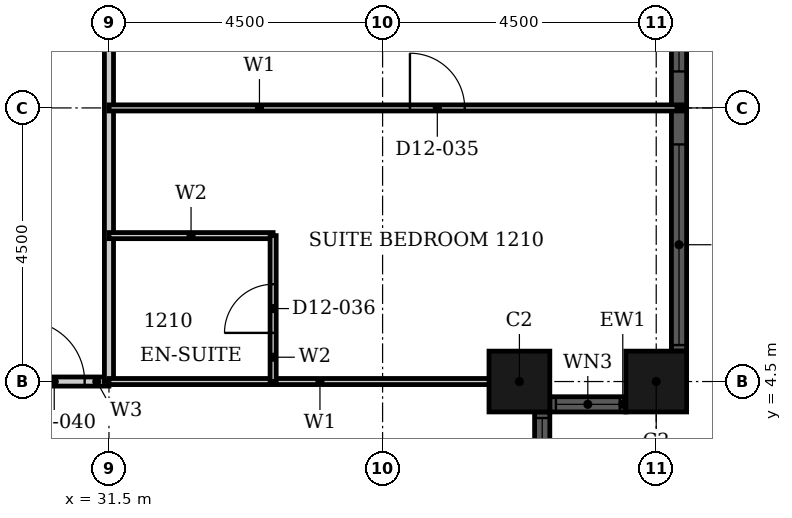
"""IFC4 building model, lengths in metres.
Left out: names, types, materials, properties, quantities, classifications, styles, units other than length and angle.
Written with IfcOpenShell. Run it as: python <this file> out.ifc"""

import sys

from ifc_helpers import new_model, si_unit, direction, frame, frame_2d, origin, origin_2d, place, context, subcontext, project, spatial, rectangle, hollow_rectangle, extrude, element, fill, save


model = new_model("IFC4")
c1 = context("Model", 3, precision=1e-05, world=origin(), true_north=direction((0.0, 1.0)))
c2 = subcontext(c1, "Body", "Model", "MODEL_VIEW")
j1 = project(units=[si_unit("LENGTHUNIT", "METRE"), si_unit("PLANEANGLEUNIT", "RADIAN")], contexts=[c1])
p1 = place(None, origin())
s1 = spatial("IfcSite", under=j1, at=p1, CompositionType="ELEMENT")
p2 = place(p1, origin())
s2 = spatial("IfcBuilding", under=s1, at=p2, CompositionType="ELEMENT")
p3 = place(p2, frame((0.0, 0.0, 56.4)))
s3 = spatial("IfcBuildingStorey", under=s2, at=p3, CompositionType="ELEMENT", Elevation=56.4)
for number, where, z_axis, x_axis in (
    (1, (38.25, 4.5, 0.0), (0.0, 0.0, 1.0), (1.0, 0.0, 0.0)),
    (2, (40.5, 4.5, 0.0), (0.0, 0.0, 1.0), (1.0, 0.0, 0.0)),
):
    element("IfcColumn", number, at=place(p3, frame(where, z_axis=z_axis, x_axis=x_axis)), inside=s3, PredefinedType="COLUMN", context=c2, shape_type="SweptSolid", body=[
        extrude(hollow_rectangle(XDim=1.0, YDim=1.0, WallThickness=0.032, at=origin_2d()), origin(), (0.0, 0.0, 1.0), 3.6),
    ])
p4 = place(p3, frame((38.625, 2.75, 0.0), z_axis=(0.0, 0.0, 1.0), x_axis=(0.0, 1.0, 0.0)))
e3 = element("IfcWall", 3, at=p4, inside=s3, PredefinedType="SOLIDWALL", context=c2, shape_type="SweptSolid", body=[
    extrude(rectangle(XDim=1.25, YDim=0.25, at=frame_2d((0.625, 0.0))), origin(), (0.0, 0.0, 1.0), 3.6),
])
p5 = place(p4, frame((0.1, 0.0, 0.9)))
e4 = element("IfcOpeningElement", 4, at=p5, cuts=e3, PredefinedType="OPENING", context=c2, shape_type="SweptSolid", body=[
    extrude(rectangle(XDim=1.05, YDim=2.08, at=frame_2d((0.525, 1.04))), frame((0.0, 0.135, 0.0), z_axis=(0.0, -1.0, 0.0), x_axis=(1.0, 0.0, 0.0)), (0.0, 0.0, 1.0), 0.27),
])
p6 = place(p3, frame((38.75, 4.125, 0.0), z_axis=(0.0, 0.0, 1.0), x_axis=(1.0, 0.0, 0.0)))
e5 = element("IfcWall", 5, at=p6, inside=s3, PredefinedType="SOLIDWALL", context=c2, shape_type="SweptSolid", body=[
    extrude(rectangle(XDim=1.25, YDim=0.25, at=frame_2d((0.625, 0.0))), origin(), (0.0, 0.0, 1.0), 3.6),
])
p7 = place(p6, frame((0.1, 0.0, 0.9)))
e6 = element("IfcOpeningElement", 6, at=p7, cuts=e5, PredefinedType="OPENING", context=c2, shape_type="SweptSolid", body=[
    extrude(rectangle(XDim=1.05, YDim=2.08, at=frame_2d((0.525, 1.04))), frame((0.0, 0.135, 0.0), z_axis=(0.0, -1.0, 0.0), x_axis=(1.0, 0.0, 0.0)), (0.0, 0.0, 1.0), 0.27),
])
p8 = place(p3, frame((40.875, 5.0, 0.0), z_axis=(0.0, 0.0, 1.0), x_axis=(0.0, 1.0, 0.0)))
e7 = element("IfcWall", 7, at=p8, inside=s3, PredefinedType="SOLIDWALL", context=c2, shape_type="SweptSolid", body=[
    extrude(rectangle(XDim=8.0, YDim=0.25, at=frame_2d((4.0, 0.0))), origin(), (0.0, 0.0, 1.0), 3.6),
])
p9 = place(p8, frame((0.1, 0.0, 0.9)))
e8 = element("IfcOpeningElement", 8, at=p9, cuts=e7, PredefinedType="OPENING", context=c2, shape_type="SweptSolid", body=[
    extrude(rectangle(XDim=3.3, YDim=2.08, at=frame_2d((1.65, 1.04))), frame((0.0, 0.135, 0.0), z_axis=(0.0, -1.0, 0.0), x_axis=(1.0, 0.0, 0.0)), (0.0, 0.0, 1.0), 0.27),
])
p10 = place(p8, frame((4.6, 0.0, 0.9)))
e9 = element("IfcOpeningElement", 9, at=p10, cuts=e7, PredefinedType="OPENING", context=c2, shape_type="SweptSolid", body=[
    extrude(rectangle(XDim=3.3, YDim=2.08, at=frame_2d((1.65, 1.04))), frame((0.0, 0.135, 0.0), z_axis=(0.0, -1.0, 0.0), x_axis=(1.0, 0.0, 0.0)), (0.0, 0.0, 1.0), 0.27),
])
p11 = place(p3, frame((29.7, 4.5, 0.0), z_axis=(0.0, 0.0, 1.0), x_axis=(1.0, 0.0, 0.0)))
e10 = element("IfcWall", 10, at=p11, inside=s3, PredefinedType="PARTITIONING", context=c2, shape_type="SweptSolid", body=[
    extrude(rectangle(XDim=1.8, YDim=0.15, at=frame_2d((0.9, 0.0))), origin(), (0.0, 0.0, 1.0), 3.3),
])
p12 = place(p11, frame((0.4, 0.0, 0.0)))
e11 = element("IfcOpeningElement", 11, at=p12, cuts=e10, PredefinedType="OPENING", context=c2, shape_type="SweptSolid", body=[
    extrude(rectangle(XDim=1.0, YDim=2.1, at=frame_2d((0.5, 1.05))), frame((0.0, 0.085, 0.0), z_axis=(0.0, -1.0, 0.0), x_axis=(1.0, 0.0, 0.0)), (0.0, 0.0, 1.0), 0.17),
])
p13 = place(p3, frame((31.5, 4.5, 0.0), z_axis=(0.0, 0.0, 1.0), x_axis=(0.0, 1.0, 0.0)))
e12 = element("IfcWall", 12, at=p13, inside=s3, PredefinedType="PARTITIONING", context=c2, shape_type="SweptSolid", body=[
    extrude(rectangle(XDim=16.2, YDim=0.15, at=frame_2d((8.1, 0.0))), origin(), (0.0, 0.0, 1.0), 2.58),
])
p14 = place(p13, frame((6.25, 0.0, 0.0)))
e13 = element("IfcOpeningElement", 13, at=p14, cuts=e12, PredefinedType="OPENING", context=c2, shape_type="SweptSolid", body=[
    extrude(rectangle(XDim=1.0, YDim=2.1, at=frame_2d((0.5, 1.05))), frame((0.0, 0.085, 0.0), z_axis=(0.0, -1.0, 0.0), x_axis=(1.0, 0.0, 0.0)), (0.0, 0.0, 1.0), 0.17),
])
p15 = place(p3, frame((31.5, 4.5, 0.0), z_axis=(0.0, 0.0, 1.0), x_axis=(1.0, 0.0, 0.0)))
e14 = element("IfcWall", 14, at=p15, inside=s3, PredefinedType="PARTITIONING", context=c2, shape_type="SweptSolid", body=[
    extrude(rectangle(XDim=6.94, YDim=0.1, at=frame_2d((3.47, 0.0))), origin(), (0.0, 0.0, 1.0), 3.3),
])
p16 = place(p3, frame((31.5, 9.0, 0.0), z_axis=(0.0, 0.0, 1.0), x_axis=(1.0, 0.0, 0.0)))
e15 = element("IfcWall", 15, at=p16, inside=s3, PredefinedType="PARTITIONING", context=c2, shape_type="SweptSolid", body=[
    extrude(rectangle(XDim=9.44, YDim=0.1, at=frame_2d((4.72, 0.0))), origin(), (0.0, 0.0, 1.0), 3.3),
])
p17 = place(p16, frame((4.95, 0.0, 0.0)))
e16 = element("IfcOpeningElement", 16, at=p17, cuts=e15, PredefinedType="OPENING", context=c2, shape_type="SweptSolid", body=[
    extrude(rectangle(XDim=0.9, YDim=2.1, at=frame_2d((0.45, 1.05))), frame((0.0, 0.06, 0.0), z_axis=(0.0, -1.0, 0.0), x_axis=(1.0, 0.0, 0.0)), (0.0, 0.0, 1.0), 0.12),
])
p18 = place(p3, frame((31.5, 6.9, 0.0), z_axis=(0.0, 0.0, 1.0), x_axis=(1.0, 0.0, 0.0)))
e17 = element("IfcWall", 17, at=p18, inside=s3, PredefinedType="PARTITIONING", context=c2, shape_type="SweptSolid", body=[
    extrude(rectangle(XDim=2.7, YDim=0.1, at=frame_2d((1.35, 0.0))), origin(), (0.0, 0.0, 1.0), 3.3),
])
p19 = place(p3, frame((34.2, 4.5, 0.0), z_axis=(0.0, 0.0, 1.0), x_axis=(0.0, 1.0, 0.0)))
e18 = element("IfcWall", 18, at=p19, inside=s3, PredefinedType="PARTITIONING", context=c2, shape_type="SweptSolid", body=[
    extrude(rectangle(XDim=2.4, YDim=0.1, at=frame_2d((1.2, 0.0))), origin(), (0.0, 0.0, 1.0), 3.3),
])
p20 = place(p19, frame((0.8, 0.0, 0.0)))
e19 = element("IfcOpeningElement", 19, at=p20, cuts=e18, PredefinedType="OPENING", context=c2, shape_type="SweptSolid", body=[
    extrude(rectangle(XDim=0.8, YDim=2.1, at=frame_2d((0.4, 1.05))), frame((0.0, 0.06, 0.0), z_axis=(0.0, -1.0, 0.0), x_axis=(1.0, 0.0, 0.0)), (0.0, 0.0, 1.0), 0.12),
])
p21 = place(p5, origin())
e20 = element("IfcWindow", 20, at=p21, inside=s3, PartitioningType="SINGLE_PANEL", PredefinedType="WINDOW", context=c2, shape_type="SweptSolid", body=[
    extrude(rectangle(XDim=1.05, YDim=2.08, at=frame_2d((0.525, 1.04))), frame((0.0, 0.03, 0.0), z_axis=(0.0, -1.0, 0.0), x_axis=(1.0, 0.0, 0.0)), (0.0, 0.0, 1.0), 0.06),
])
fill(e4, e20)
p22 = place(p7, origin())
e21 = element("IfcWindow", 21, at=p22, inside=s3, PartitioningType="SINGLE_PANEL", PredefinedType="WINDOW", context=c2, shape_type="SweptSolid", body=[
    extrude(rectangle(XDim=1.05, YDim=2.08, at=frame_2d((0.525, 1.04))), frame((0.0, 0.03, 0.0), z_axis=(0.0, -1.0, 0.0), x_axis=(1.0, 0.0, 0.0)), (0.0, 0.0, 1.0), 0.06),
])
fill(e6, e21)
p23 = place(p9, origin())
e22 = element("IfcWindow", 22, at=p23, inside=s3, PartitioningType="SINGLE_PANEL", PredefinedType="WINDOW", context=c2, shape_type="SweptSolid", body=[
    extrude(rectangle(XDim=3.3, YDim=2.08, at=frame_2d((1.65, 1.04))), frame((0.0, 0.03, 0.0), z_axis=(0.0, -1.0, 0.0), x_axis=(1.0, 0.0, 0.0)), (0.0, 0.0, 1.0), 0.06),
])
fill(e8, e22)
p24 = place(p10, origin())
e23 = element("IfcWindow", 23, at=p24, inside=s3, PartitioningType="SINGLE_PANEL", PredefinedType="WINDOW", context=c2, shape_type="SweptSolid", body=[
    extrude(rectangle(XDim=3.3, YDim=2.08, at=frame_2d((1.65, 1.04))), frame((0.0, 0.03, 0.0), z_axis=(0.0, -1.0, 0.0), x_axis=(1.0, 0.0, 0.0)), (0.0, 0.0, 1.0), 0.06),
])
fill(e9, e23)
p25 = place(p17, origin())
e24 = element("IfcDoor", 24, at=p25, inside=s3, OperationType="SINGLE_SWING_RIGHT", PredefinedType="DOOR", context=c2, shape_type="SweptSolid", body=[
    extrude(rectangle(XDim=0.9, YDim=2.1, at=frame_2d((0.45, 1.05))), frame((0.0, 0.025, 0.0), z_axis=(0.0, -1.0, 0.0), x_axis=(1.0, 0.0, 0.0)), (0.0, 0.0, 1.0), 0.05),
])
fill(e16, e24)
p26 = place(p20, origin())
e25 = element("IfcDoor", 25, at=p26, inside=s3, OperationType="SINGLE_SWING_RIGHT", PredefinedType="DOOR", context=c2, shape_type="SweptSolid", body=[
    extrude(rectangle(XDim=0.8, YDim=2.1, at=frame_2d((0.4, 1.05))), frame((0.0, 0.025, 0.0), z_axis=(0.0, -1.0, 0.0), x_axis=(1.0, 0.0, 0.0)), (0.0, 0.0, 1.0), 0.05),
])
fill(e19, e25)
p27 = place(p12, origin())
e26 = element("IfcDoor", 26, at=p27, inside=s3, OperationType="SINGLE_SWING_RIGHT", PredefinedType="DOOR", context=c2, shape_type="SweptSolid", body=[
    extrude(rectangle(XDim=1.0, YDim=2.1, at=frame_2d((0.5, 1.05))), frame((0.0, 0.025, 0.0), z_axis=(0.0, -1.0, 0.0), x_axis=(1.0, 0.0, 0.0)), (0.0, 0.0, 1.0), 0.05),
])
fill(e11, e26)
save(model, sys.argv[1])
